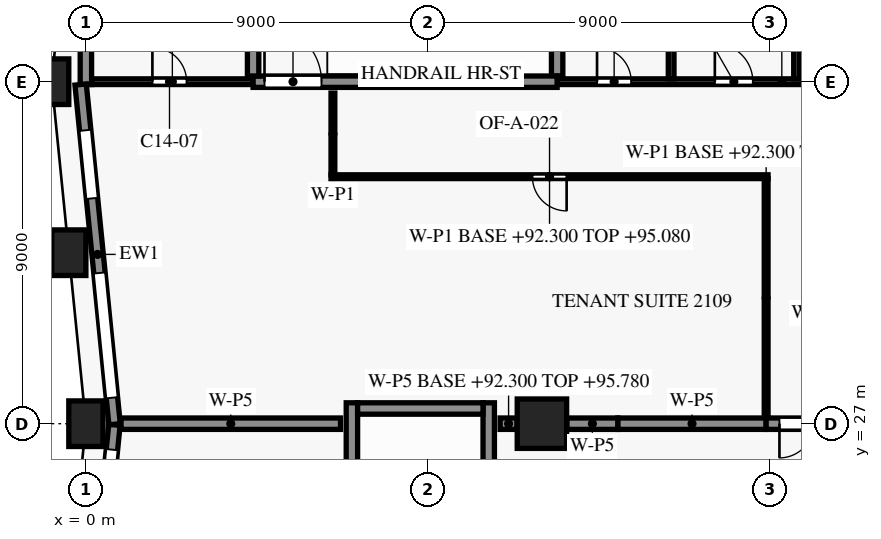
"""IFC4 building model, lengths in metres.
Left out: names, types, materials, properties, quantities, classifications, styles, units other than length and angle.
Written with IfcOpenShell. Run it as: python <this file> out.ifc"""

import sys

from ifc_helpers import new_model, si_unit, direction, frame, frame_2d, origin, origin_2d, place, context, subcontext, project, spatial, rectangle, extrude, element, fill, save


model = new_model("IFC4")
c1 = context("Model", 3, precision=1e-05, world=origin(), true_north=direction((0.0, 1.0)))
c2 = subcontext(c1, "Body", "Model", "MODEL_VIEW")
j1 = project(units=[si_unit("LENGTHUNIT", "METRE"), si_unit("PLANEANGLEUNIT", "RADIAN")], contexts=[c1])
p1 = place(None, origin())
s1 = spatial("IfcSite", under=j1, at=p1, CompositionType="ELEMENT")
p2 = place(p1, origin())
s2 = spatial("IfcBuilding", under=s1, at=p2, CompositionType="ELEMENT")
p3 = place(p2, frame((0.0, 0.0, 92.3)))
s3 = spatial("IfcBuildingStorey", under=s2, at=p3, CompositionType="ELEMENT", Elevation=92.3)
for number, where, z_axis, x_axis in (
    (1, (-0.9, 36.0, 0.0), (0.0, 0.0, 1.0), (0.0, -1.0, 0.0)),
    (2, (-0.45, 31.5, 0.0), (0.0, 0.0, 1.0), (0.1, -0.995, 0.0)),
    (3, (0.0, 27.0, 0.0), (0.0, 0.0, 1.0), (0.0, -1.0, 0.0)),
):
    element("IfcColumn", number, at=place(p3, frame(where, z_axis=z_axis, x_axis=x_axis)), inside=s3, PredefinedType="COLUMN", context=c2, shape_type="SweptSolid", body=[
        extrude(rectangle(XDim=0.9, YDim=1.2, at=origin_2d()), origin(), (0.0, 0.0, 1.0), 3.8),
    ])
p4 = place(p3, frame((12.0, 27.0, 0.0), z_axis=(0.0, 0.0, 1.0), x_axis=(1.0, 0.0, 0.0)))
e4 = element("IfcColumn", 4, at=p4, inside=s3, PredefinedType="COLUMN", context=c2, shape_type="SweptSolid", body=[
    extrude(rectangle(XDim=1.3, YDim=1.3, at=origin_2d()), origin(), (0.0, 0.0, 1.0), 3.8),
])
p5 = place(p3, frame((0.755, 26.985, 0.0), z_axis=(0.0, 0.0, 1.0), x_axis=(-0.099479505633, 0.995039611251, 0.0)))
e5 = element("IfcWall", 5, at=p5, inside=s3, PredefinedType="SOLIDWALL", context=c2, shape_type="SweptSolid", body=[
    extrude(rectangle(XDim=8.985, YDim=0.3, at=frame_2d((4.492, 0.0))), origin(), (0.0, 0.0, 1.0), 3.15),
])
p6 = place(p5, frame((0.701, 0.0, 0.15)))
e6 = element("IfcOpeningElement", 6, at=p6, cuts=e5, PredefinedType="OPENING", context=c2, shape_type="SweptSolid", body=[
    extrude(rectangle(XDim=3.3, YDim=2.4, at=frame_2d((1.65, 1.2))), frame((0.0, 0.16, 0.0), z_axis=(0.0, -1.0, 0.0), x_axis=(1.0, 0.0, 0.0)), (0.0, 0.0, 1.0), 0.32),
])
p7 = place(p5, frame((5.974, 0.0, 0.75)))
e7 = element("IfcOpeningElement", 7, at=p7, cuts=e5, PredefinedType="OPENING", context=c2, shape_type="SweptSolid", body=[
    extrude(rectangle(XDim=1.8, YDim=1.8, at=frame_2d((0.9, 0.9))), frame((0.0, 0.16, 0.0), z_axis=(0.0, -1.0, 0.0), x_axis=(1.0, 0.0, 0.0)), (0.0, 0.0, 1.0), 0.32),
])
p8 = place(p3, frame((-0.148, 17.985, 0.0), z_axis=(0.0, 0.0, 1.0), x_axis=(0.099495688264, 0.995037993253, 0.0)))
e8 = element("IfcWall", 8, at=p8, inside=s3, PredefinedType="SOLIDWALL", context=c2, shape_type="SweptSolid", body=[
    extrude(rectangle(XDim=9.03, YDim=0.3, at=frame_2d((4.515, 0.0))), origin(), (0.0, 0.0, 1.0), 3.15),
])
p9 = place(p8, frame((1.301, 0.0, 0.75)))
e9 = element("IfcOpeningElement", 9, at=p9, cuts=e8, PredefinedType="OPENING", context=c2, shape_type="SweptSolid", body=[
    extrude(rectangle(XDim=1.8, YDim=1.8, at=frame_2d((0.9, 0.9))), frame((0.0, 0.16, 0.0), z_axis=(0.0, -1.0, 0.0), x_axis=(1.0, 0.0, 0.0)), (0.0, 0.0, 1.0), 0.32),
])
p10 = place(p8, frame((5.073, 0.0, 0.15)))
e10 = element("IfcOpeningElement", 10, at=p10, cuts=e8, PredefinedType="OPENING", context=c2, shape_type="SweptSolid", body=[
    extrude(rectangle(XDim=3.3, YDim=2.4, at=frame_2d((1.65, 1.2))), frame((0.0, 0.16, 0.0), z_axis=(0.0, -1.0, 0.0), x_axis=(1.0, 0.0, 0.0)), (0.0, 0.0, 1.0), 0.32),
])
p11 = place(p3, frame((7.15, 27.4, 0.0), z_axis=(0.0, 0.0, 1.0), x_axis=(1.0, 0.0, 0.0)))
e11 = element("IfcWall", 11, at=p11, inside=s3, PredefinedType="SHEAR", context=c2, shape_type="SweptSolid", body=[
    extrude(rectangle(XDim=3.3, YDim=0.3, at=frame_2d((1.65, 0.0))), origin(), (0.0, 0.0, 1.0), 3.5),
])
p12 = place(p3, frame((0.15, 36.0, 0.0), z_axis=(0.0, 0.0, 1.0), x_axis=(1.0, 0.0, 0.0)))
e12 = element("IfcWall", 12, at=p12, inside=s3, PredefinedType="PARTITIONING", context=c2, shape_type="SweptSolid", body=[
    extrude(rectangle(XDim=4.25, YDim=0.15, at=frame_2d((2.125, 0.0))), origin(), (0.0, 0.0, 1.0), 3.5),
])
p13 = place(p12, frame((1.6, 0.0, 0.0)))
e13 = element("IfcOpeningElement", 13, at=p13, cuts=e12, PredefinedType="OPENING", context=c2, shape_type="SweptSolid", body=[
    extrude(rectangle(XDim=0.9, YDim=2.1, at=frame_2d((0.45, 1.05))), frame((0.0, 0.085, 0.0), z_axis=(0.0, -1.0, 0.0), x_axis=(1.0, 0.0, 0.0)), (0.0, 0.0, 1.0), 0.17),
])
p14 = place(p3, frame((12.4, 36.0, 0.0), z_axis=(0.0, 0.0, 1.0), x_axis=(1.0, 0.0, 0.0)))
e14 = element("IfcWall", 14, at=p14, inside=s3, PredefinedType="SHEAR", context=c2, shape_type="SweptSolid", body=[
    extrude(rectangle(XDim=11.825, YDim=0.15, at=frame_2d((5.913, 0.0))), origin(), (0.0, 0.0, 1.0), 3.5),
])
p15 = place(p14, frame((1.05, 0.0, 0.0)))
e15 = element("IfcOpeningElement", 15, at=p15, cuts=e14, PredefinedType="OPENING", context=c2, shape_type="SweptSolid", body=[
    extrude(rectangle(XDim=0.9, YDim=2.1, at=frame_2d((0.45, 1.05))), frame((0.0, 0.085, 0.0), z_axis=(0.0, -1.0, 0.0), x_axis=(1.0, 0.0, 0.0)), (0.0, 0.0, 1.0), 0.17),
])
p16 = place(p14, frame((4.15, 0.0, 0.0)))
e16 = element("IfcOpeningElement", 16, at=p16, cuts=e14, PredefinedType="OPENING", context=c2, shape_type="SweptSolid", body=[
    extrude(rectangle(XDim=1.0, YDim=2.1, at=frame_2d((0.5, 1.05))), frame((0.0, 0.085, 0.0), z_axis=(0.0, -1.0, 0.0), x_axis=(1.0, 0.0, 0.0)), (0.0, 0.0, 1.0), 0.17),
])
p17 = place(p14, frame((7.35, 0.0, 0.0)))
e17 = element("IfcOpeningElement", 17, at=p17, cuts=e14, PredefinedType="OPENING", context=c2, shape_type="SweptSolid", body=[
    extrude(rectangle(XDim=0.9, YDim=2.1, at=frame_2d((0.45, 1.05))), frame((0.0, 0.085, 0.0), z_axis=(0.0, -1.0, 0.0), x_axis=(1.0, 0.0, 0.0)), (0.0, 0.0, 1.0), 0.17),
])
p18 = place(p14, frame((10.125, 0.0, 0.0)))
e18 = element("IfcOpeningElement", 18, at=p18, cuts=e14, PredefinedType="OPENING", context=c2, shape_type="SweptSolid", body=[
    extrude(rectangle(XDim=0.95, YDim=2.1, at=frame_2d((0.475, 1.05))), frame((0.0, 0.085, 0.0), z_axis=(0.0, -1.0, 0.0), x_axis=(1.0, 0.0, 0.0)), (0.0, 0.0, 1.0), 0.17),
])
p19 = place(p3, frame((4.4, 36.0, 0.0), z_axis=(0.0, 0.0, 1.0), x_axis=(1.0, 0.0, 0.0)))
e19 = element("IfcWall", 19, at=p19, inside=s3, PredefinedType="SHEAR", context=c2, shape_type="SweptSolid", body=[
    extrude(rectangle(XDim=8.0, YDim=0.3, at=frame_2d((4.0, 0.0))), origin(), (0.0, 0.0, 1.0), 3.5),
])
p20 = place(p19, frame((0.3, 0.0, 0.0)))
e20 = element("IfcOpeningElement", 20, at=p20, cuts=e19, PredefinedType="OPENING", context=c2, shape_type="SweptSolid", body=[
    extrude(rectangle(XDim=1.5, YDim=2.2, at=frame_2d((0.75, 1.1))), frame((0.0, 0.16, 0.0), z_axis=(0.0, -1.0, 0.0), x_axis=(1.0, 0.0, 0.0)), (0.0, 0.0, 1.0), 0.32),
])
p21 = place(p3, frame((0.0, 35.925, 0.0), z_axis=(0.0, 0.0, 1.0), x_axis=(0.0, 1.0, 0.0)))
e21 = element("IfcWall", 21, at=p21, inside=s3, PredefinedType="SHEAR", context=c2, shape_type="SweptSolid", body=[
    extrude(rectangle(XDim=7.35, YDim=0.3, at=frame_2d((3.675, 0.0))), origin(), (0.0, 0.0, 1.0), 3.5),
])
p22 = place(p3, frame((4.4, 36.15, 0.0), z_axis=(0.0, 0.0, 1.0), x_axis=(0.0, 1.0, 0.0)))
e22 = element("IfcWall", 22, at=p22, inside=s3, PredefinedType="SHEAR", context=c2, shape_type="SweptSolid", body=[
    extrude(rectangle(XDim=3.45, YDim=0.3, at=frame_2d((1.725, 0.0))), origin(), (0.0, 0.0, 1.0), 3.5),
])
p23 = place(p3, frame((7.0, 19.25, 0.0), z_axis=(0.0, 0.0, 1.0), x_axis=(0.0, 1.0, 0.0)))
e23 = element("IfcWall", 23, at=p23, inside=s3, PredefinedType="SHEAR", context=c2, shape_type="SweptSolid", body=[
    extrude(rectangle(XDim=8.3, YDim=0.3, at=frame_2d((4.15, 0.0))), origin(), (0.0, 0.0, 1.0), 3.5),
])
p24 = place(p3, frame((10.6, 19.25, 0.0), z_axis=(0.0, 0.0, 1.0), x_axis=(0.0, 1.0, 0.0)))
e24 = element("IfcWall", 24, at=p24, inside=s3, PredefinedType="SHEAR", context=c2, shape_type="SweptSolid", body=[
    extrude(rectangle(XDim=8.3, YDim=0.3, at=frame_2d((4.15, 0.0))), origin(), (0.0, 0.0, 1.0), 3.5),
])
p25 = place(p24, frame((0.55, 0.0, 0.0)))
e25 = element("IfcOpeningElement", 25, at=p25, cuts=e24, PredefinedType="OPENING", context=c2, shape_type="SweptSolid", body=[
    extrude(rectangle(XDim=1.2, YDim=2.2, at=frame_2d((0.6, 1.1))), frame((0.0, 0.16, 0.0), z_axis=(0.0, -1.0, 0.0), x_axis=(1.0, 0.0, 0.0)), (0.0, 0.0, 1.0), 0.32),
])
p26 = place(p3, frame((12.4, 36.15, 0.0), z_axis=(0.0, 0.0, 1.0), x_axis=(0.0, 1.0, 0.0)))
e26 = element("IfcWall", 26, at=p26, inside=s3, PredefinedType="SHEAR", context=c2, shape_type="SweptSolid", body=[
    extrude(rectangle(XDim=3.725, YDim=0.3, at=frame_2d((1.863, 0.0))), origin(), (0.0, 0.0, 1.0), 3.5),
])
for number, where, z_axis, x_axis in (
    (27, (15.4, 36.075, 0.0), (0.0, 0.0, 1.0), (0.0, 1.0, 0.0)),
    (28, (18.7, 36.075, 0.0), (0.0, 0.0, 1.0), (0.0, 1.0, 0.0)),
):
    element("IfcWall", number, at=place(p3, frame(where, z_axis=z_axis, x_axis=x_axis)), inside=s3, PredefinedType="PARTITIONING", context=c2, shape_type="SweptSolid", body=[
        extrude(rectangle(XDim=3.8, YDim=0.15, at=frame_2d((1.9, 0.0))), origin(), (0.0, 0.0, 1.0), 3.5),
    ])
p27 = place(p3, frame((0.925, 27.0, 0.0), z_axis=(0.0, 0.0, 1.0), x_axis=(1.0, 0.0, 0.0)))
e29 = element("IfcWall", 29, at=p27, inside=s3, PredefinedType="PARTITIONING", context=c2, shape_type="SweptSolid", body=[
    extrude(rectangle(XDim=5.775, YDim=0.3, at=frame_2d((2.888, 0.0))), origin(), (0.0, 0.0, 1.0), 2.78),
])
p28 = place(p3, frame((10.9, 27.0, 0.0), z_axis=(0.0, 0.0, 1.0), x_axis=(1.0, 0.0, 0.0)))
e30 = element("IfcWall", 30, at=p28, inside=s3, PredefinedType="PARTITIONING", context=c2, shape_type="SweptSolid", body=[
    extrude(rectangle(XDim=0.445, YDim=0.3, at=frame_2d((0.223, 0.0))), origin(), (0.0, 0.0, 1.0), 3.48),
])
p29 = place(p3, frame((12.655, 27.0, 0.0), z_axis=(0.0, 0.0, 1.0), x_axis=(1.0, 0.0, 0.0)))
e31 = element("IfcWall", 31, at=p29, inside=s3, PredefinedType="PARTITIONING", context=c2, shape_type="SweptSolid", body=[
    extrude(rectangle(XDim=1.345, YDim=0.3, at=frame_2d((0.672, 0.0))), origin(), (0.0, 0.0, 1.0), 2.78),
])
p30 = place(p3, frame((14.0, 27.0, 0.0), z_axis=(0.0, 0.0, 1.0), x_axis=(1.0, 0.0, 0.0)))
e32 = element("IfcWall", 32, at=p30, inside=s3, PredefinedType="PARTITIONING", context=c2, shape_type="SweptSolid", body=[
    extrude(rectangle(XDim=3.9, YDim=0.3, at=frame_2d((1.95, 0.0))), origin(), (0.0, 0.0, 1.0), 2.78),
])
p31 = place(p3, frame((20.4, 27.0, 0.0), z_axis=(0.0, 0.0, 1.0), x_axis=(-1.0, 0.0, 0.0)))
e33 = element("IfcWall", 33, at=p31, inside=s3, PredefinedType="PARTITIONING", context=c2, shape_type="SweptSolid", body=[
    extrude(rectangle(XDim=2.5, YDim=0.3, at=frame_2d((1.25, 0.0))), origin(), (0.0, 0.0, 1.0), 2.78),
])
p32 = place(p31, frame((0.35, 0.0, 0.0)))
e34 = element("IfcOpeningElement", 34, at=p32, cuts=e33, PredefinedType="OPENING", context=c2, shape_type="SweptSolid", body=[
    extrude(rectangle(XDim=1.8, YDim=2.1, at=frame_2d((0.9, 1.05))), frame((0.0, 0.16, 0.0), z_axis=(0.0, -1.0, 0.0), x_axis=(1.0, 0.0, 0.0)), (0.0, 0.0, 1.0), 0.32),
])
p33 = place(p3, frame((17.9, 27.17, 0.0), z_axis=(0.0, 0.0, 1.0), x_axis=(0.0, 1.0, 0.0)))
e35 = element("IfcWall", 35, at=p33, inside=s3, PredefinedType="PARTITIONING", context=c2, shape_type="SweptSolid", body=[
    extrude(rectangle(XDim=6.28, YDim=0.1, at=frame_2d((3.14, 0.0))), origin(), (0.0, 0.0, 1.0), 2.78),
])
p34 = place(p3, frame((17.95, 33.5, 0.0), z_axis=(0.0, 0.0, 1.0), x_axis=(-1.0, 0.0, 0.0)))
e36 = element("IfcWall", 36, at=p34, inside=s3, PredefinedType="PARTITIONING", context=c2, shape_type="SweptSolid", body=[
    extrude(rectangle(XDim=11.5, YDim=0.1, at=frame_2d((5.75, 0.0))), origin(), (0.0, 0.0, 1.0), 2.78),
])
p35 = place(p34, frame((5.3, 0.0, 0.0)))
e37 = element("IfcOpeningElement", 37, at=p35, cuts=e36, PredefinedType="OPENING", context=c2, shape_type="SweptSolid", body=[
    extrude(rectangle(XDim=0.9, YDim=2.1, at=frame_2d((0.45, 1.05))), frame((0.0, 0.06, 0.0), z_axis=(0.0, -1.0, 0.0), x_axis=(1.0, 0.0, 0.0)), (0.0, 0.0, 1.0), 0.12),
])
p36 = place(p3, frame((6.5, 33.55, 0.0), z_axis=(0.0, 0.0, 1.0), x_axis=(0.0, 1.0, 0.0)))
e38 = element("IfcWall", 38, at=p36, inside=s3, PredefinedType="PARTITIONING", context=c2, shape_type="SweptSolid", body=[
    extrude(rectangle(XDim=2.15, YDim=0.1, at=frame_2d((1.075, 0.0))), origin(), (0.0, 0.0, 1.0), 3.48),
])
p37 = place(p6, origin())
e39 = element("IfcWindow", 39, at=p37, inside=s3, PartitioningType="SINGLE_PANEL", PredefinedType="WINDOW", context=c2, shape_type="SweptSolid", body=[
    extrude(rectangle(XDim=3.3, YDim=2.4, at=frame_2d((1.65, 1.2))), frame((0.0, 0.03, 0.0), z_axis=(0.0, -1.0, 0.0), x_axis=(1.0, 0.0, 0.0)), (0.0, 0.0, 1.0), 0.06),
])
fill(e6, e39)
p38 = place(p7, origin())
e40 = element("IfcWindow", 40, at=p38, inside=s3, PartitioningType="SINGLE_PANEL", PredefinedType="WINDOW", context=c2, shape_type="SweptSolid", body=[
    extrude(rectangle(XDim=1.8, YDim=1.8, at=frame_2d((0.9, 0.9))), frame((0.0, 0.03, 0.0), z_axis=(0.0, -1.0, 0.0), x_axis=(1.0, 0.0, 0.0)), (0.0, 0.0, 1.0), 0.06),
])
fill(e7, e40)
p39 = place(p10, origin())
e41 = element("IfcWindow", 41, at=p39, inside=s3, PartitioningType="SINGLE_PANEL", PredefinedType="WINDOW", context=c2, shape_type="SweptSolid", body=[
    extrude(rectangle(XDim=3.3, YDim=2.4, at=frame_2d((1.65, 1.2))), frame((0.0, 0.03, 0.0), z_axis=(0.0, -1.0, 0.0), x_axis=(1.0, 0.0, 0.0)), (0.0, 0.0, 1.0), 0.06),
])
fill(e10, e41)
p40 = place(p15, origin())
e42 = element("IfcDoor", 42, at=p40, inside=s3, OperationType="SINGLE_SWING_RIGHT", PredefinedType="DOOR", context=c2, shape_type="SweptSolid", body=[
    extrude(rectangle(XDim=0.9, YDim=2.1, at=frame_2d((0.45, 1.05))), frame((0.0, 0.025, 0.0), z_axis=(0.0, -1.0, 0.0), x_axis=(1.0, 0.0, 0.0)), (0.0, 0.0, 1.0), 0.05),
])
fill(e15, e42)
p41 = place(p16, origin())
e43 = element("IfcDoor", 43, at=p41, inside=s3, OperationType="SINGLE_SWING_LEFT", PredefinedType="DOOR", context=c2, shape_type="SweptSolid", body=[
    extrude(rectangle(XDim=1.0, YDim=2.1, at=frame_2d((0.5, 1.05))), frame((0.0, 0.025, 0.0), z_axis=(0.0, -1.0, 0.0), x_axis=(1.0, 0.0, 0.0)), (0.0, 0.0, 1.0), 0.05),
])
fill(e16, e43)
p42 = place(p13, origin())
e44 = element("IfcDoor", 44, at=p42, inside=s3, OperationType="SINGLE_SWING_LEFT", PredefinedType="DOOR", context=c2, shape_type="SweptSolid", body=[
    extrude(rectangle(XDim=0.9, YDim=2.1, at=frame_2d((0.45, 1.05))), frame((0.0, 0.025, 0.0), z_axis=(0.0, -1.0, 0.0), x_axis=(1.0, 0.0, 0.0)), (0.0, 0.0, 1.0), 0.05),
])
fill(e13, e44)
p43 = place(p20, origin())
e45 = element("IfcDoor", 45, at=p43, inside=s3, OperationType="SINGLE_SWING_RIGHT", PredefinedType="DOOR", context=c2, shape_type="SweptSolid", body=[
    extrude(rectangle(XDim=1.5, YDim=2.2, at=frame_2d((0.75, 1.1))), frame((0.0, 0.025, 0.0), z_axis=(0.0, -1.0, 0.0), x_axis=(1.0, 0.0, 0.0)), (0.0, 0.0, 1.0), 0.05),
])
fill(e20, e45)
p44 = place(p35, origin())
e46 = element("IfcDoor", 46, at=p44, inside=s3, OperationType="SINGLE_SWING_LEFT", PredefinedType="DOOR", context=c2, shape_type="SweptSolid", body=[
    extrude(rectangle(XDim=0.9, YDim=2.1, at=frame_2d((0.45, 1.05))), frame((0.0, 0.025, 0.0), z_axis=(0.0, -1.0, 0.0), x_axis=(1.0, 0.0, 0.0)), (0.0, 0.0, 1.0), 0.05),
])
fill(e37, e46)
p45 = place(p32, origin())
e47 = element("IfcDoor", 47, at=p45, inside=s3, OperationType="DOUBLE_DOOR_SINGLE_SWING", PredefinedType="DOOR", context=c2, shape_type="SweptSolid", body=[
    extrude(rectangle(XDim=1.8, YDim=2.1, at=frame_2d((0.9, 1.05))), frame((0.0, 0.025, 0.0), z_axis=(0.0, -1.0, 0.0), x_axis=(1.0, 0.0, 0.0)), (0.0, 0.0, 1.0), 0.05),
])
fill(e34, e47)
save(model, sys.argv[1])
